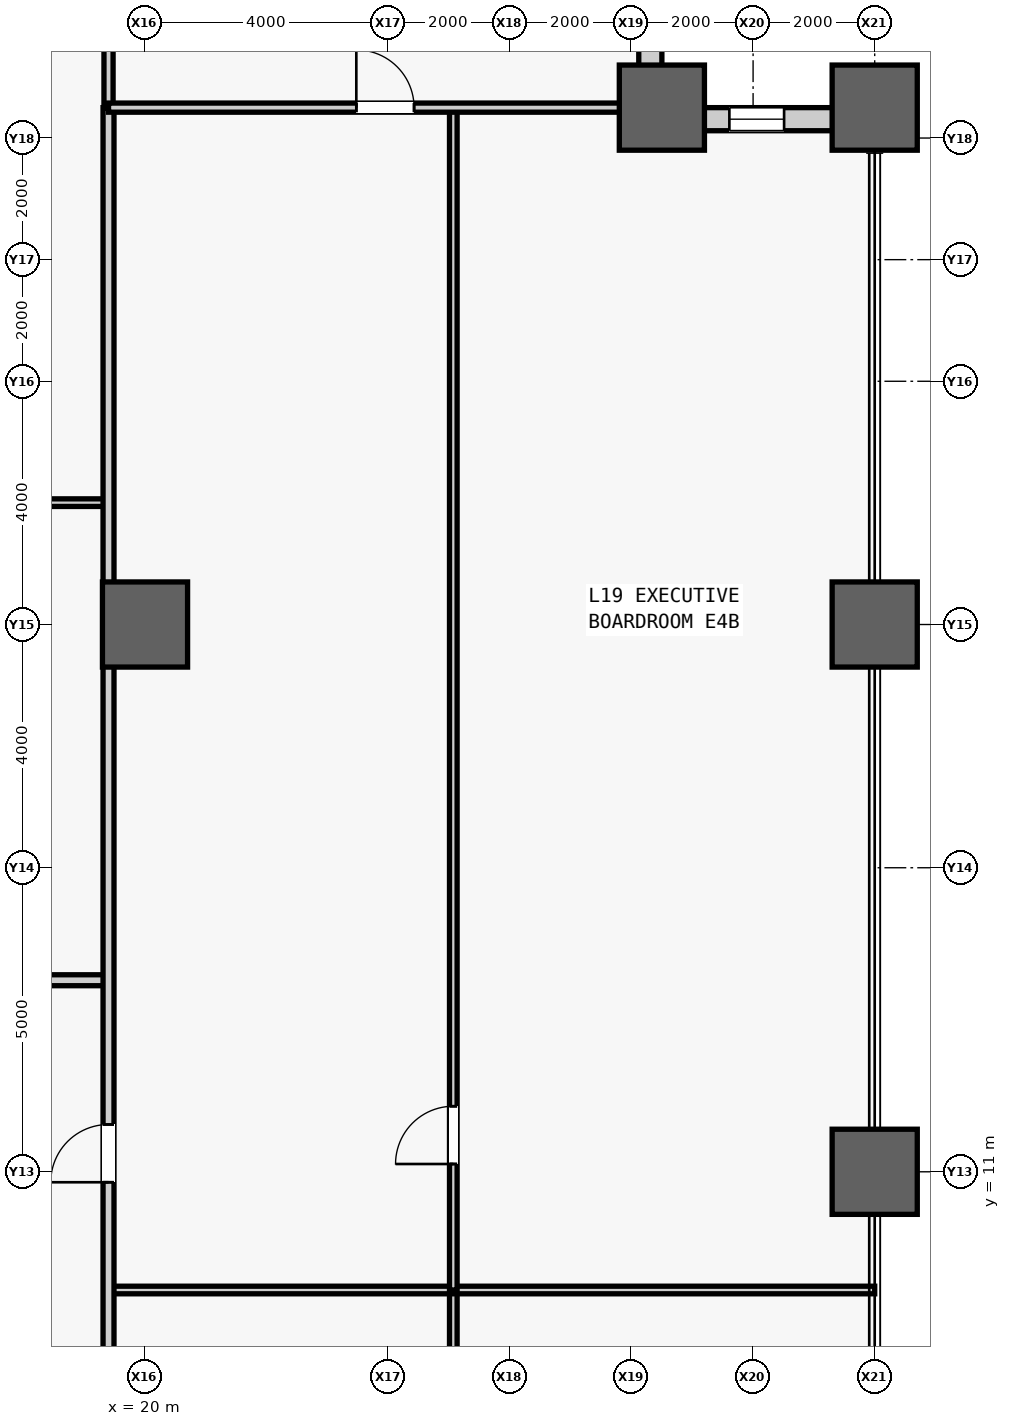
"""IFC4 building model, lengths in metres.
Left out: names, types, materials, properties, quantities, classifications, styles, units other than length and angle.
Written with IfcOpenShell. Run it as: python <this file> out.ifc"""

import sys

from ifc_helpers import new_model, si_unit, direction, frame, frame_2d, origin, origin_2d, place, context, subcontext, project, spatial, rectangle, hollow_rectangle, extrude, source, transform, mapped, element, fill, save


model = new_model("IFC4")
c1 = context("Model", 3, precision=1e-05, world=origin(), true_north=direction((0.0, 1.0)))
c2 = subcontext(c1, "Body", "Model", "MODEL_VIEW")
j1 = project(units=[si_unit("LENGTHUNIT", "METRE"), si_unit("PLANEANGLEUNIT", "RADIAN")], contexts=[c1])
p1 = place(None, origin())
s1 = spatial("IfcSite", under=j1, at=p1, CompositionType="ELEMENT")
p2 = place(p1, origin())
s2 = spatial("IfcBuilding", under=s1, at=p2, CompositionType="ELEMENT")
p3 = place(p2, frame((0.0, 0.0, 87.2)))
s3 = spatial("IfcBuildingStorey", under=s2, at=p3, CompositionType="ELEMENT", Elevation=87.2)
m1 = source(origin(), c2, "Body", "SweptSolid", [
    extrude(hollow_rectangle(XDim=1.4, YDim=1.4, WallThickness=0.075, at=origin_2d()), origin(), (0.0, 0.0, 1.0), 4.2),
])
for number, where, z_axis, x_axis in (
    (1, (20.0, 20.0, 0.0), (0.0, 0.0, 1.0), (1.0, 0.0, 0.0)),
    (2, (28.5, 28.5, 0.0), (0.0, 0.0, 1.0), (1.0, 0.0, 0.0)),
    (3, (32.0, 11.0, 0.0), (0.0, 0.0, 1.0), (1.0, 0.0, 0.0)),
    (4, (32.0, 20.0, 0.0), (0.0, 0.0, 1.0), (1.0, 0.0, 0.0)),
    (5, (32.0, 28.5, 0.0), (0.0, 0.0, 1.0), (1.0, 0.0, 0.0)),
):
    element("IfcColumn", number, at=place(p3, frame(where, z_axis=z_axis, x_axis=x_axis)), inside=s3, PredefinedType="COLUMN", context=c2, shape_type="MappedRepresentation", body=[
        mapped(m1, transform((0.0, 0.0, 0.0), scale=1.0)),
    ])
m2 = source(origin(), c2, "Body", "SweptSolid", [
    extrude(rectangle(XDim=3.12, YDim=0.38, at=frame_2d((1.56, 0.0))), origin(), (0.0, 0.0, 1.0), 3.245),
])
p4 = place(p3, frame((28.5, 28.31, 0.0), z_axis=(0.0, 0.0, 1.0), x_axis=(1.0, 0.0, 0.0)))
e6 = element("IfcWall", 6, at=p4, inside=s3, PredefinedType="STANDARD", context=c2, shape_type="MappedRepresentation", body=[
    mapped(m2, transform((0.0, 0.0, 0.0), scale=1.0)),
])
m3 = source(origin(), c2, "Body", "SweptSolid", [
    extrude(rectangle(XDim=0.9, YDim=2.4, at=frame_2d((0.45, 1.2))), frame((0.0, 0.2, 0.0), z_axis=(0.0, -1.0, 0.0), x_axis=(1.0, 0.0, 0.0)), (0.0, 0.0, 1.0), 0.4),
])
p5 = place(p4, frame((1.11, 0.0, 0.5)))
e7 = element("IfcOpeningElement", 7, at=p5, cuts=e6, PredefinedType="OPENING", context=c2, shape_type="MappedRepresentation", body=[
    mapped(m3, transform((0.0, 0.0, 0.0), scale=1.0)),
])
m4 = source(origin(), c2, "Body", "SweptSolid", [
    extrude(rectangle(XDim=3.12, YDim=0.38, at=frame_2d((1.56, 0.0))), origin(), (0.0, 0.0, 1.0), 2.54),
])
p6 = place(p3, frame((28.31, 28.5, 0.0), z_axis=(0.0, 0.0, 1.0), x_axis=(0.0, 1.0, 0.0)))
e8 = element("IfcWall", 8, at=p6, inside=s3, PredefinedType="STANDARD", context=c2, shape_type="MappedRepresentation", body=[
    mapped(m4, transform((0.0, 0.0, 0.0), scale=1.0)),
])
m5 = source(origin(), c2, "Body", "SweptSolid", [
    extrude(rectangle(XDim=0.9, YDim=1.82, at=frame_2d((0.45, 0.91))), frame((0.0, 0.2, 0.0), z_axis=(0.0, -1.0, 0.0), x_axis=(1.0, 0.0, 0.0)), (0.0, 0.0, 1.0), 0.4),
])
p7 = place(p6, frame((1.11, 0.0, 0.5)))
e9 = element("IfcOpeningElement", 9, at=p7, cuts=e8, PredefinedType="OPENING", context=c2, shape_type="MappedRepresentation", body=[
    mapped(m5, transform((0.0, 0.0, 0.0), scale=1.0)),
])
m6 = source(origin(), c2, "Body", "SweptSolid", [
    extrude(rectangle(XDim=12.903, YDim=0.125, at=frame_2d((6.451, 0.0))), origin(), (0.0, 0.0, 1.0), 3.94),
])
p8 = place(p3, frame((6.497, 22.004, 0.0), z_axis=(0.0, 0.0, 1.0), x_axis=(1.0, 0.0, 0.0)))
e10 = element("IfcWall", 10, at=p8, inside=s3, PredefinedType="PARTITIONING", context=c2, shape_type="MappedRepresentation", body=[
    mapped(m6, transform((0.0, 0.0, 0.0), scale=1.0)),
])
m7 = source(origin(), c2, "Body", "SweptSolid", [
    extrude(rectangle(XDim=0.95, YDim=2.15, at=frame_2d((0.475, 1.075))), frame((0.0, 0.073, 0.0), z_axis=(0.0, -1.0, 0.0), x_axis=(1.0, 0.0, 0.0)), (0.0, 0.0, 1.0), 0.145),
])
p9 = place(p8, frame((5.977, 0.0, 0.0)))
e11 = element("IfcOpeningElement", 11, at=p9, cuts=e10, PredefinedType="OPENING", context=c2, shape_type="MappedRepresentation", body=[
    mapped(m7, transform((0.0, 0.0, 0.0), scale=1.0)),
])
m8 = source(origin(), c2, "Body", "SweptSolid", [
    extrude(rectangle(XDim=37.95, YDim=0.18, at=frame_2d((18.975, 0.0))), origin(), (0.0, 0.0, 1.0), 3.94),
])
p10 = place(p3, frame((-18.55, 14.15, 0.0), z_axis=(0.0, 0.0, 1.0), x_axis=(1.0, 0.0, 0.0)))
e12 = element("IfcWall", 12, at=p10, inside=s3, PredefinedType="PARTITIONING", context=c2, shape_type="MappedRepresentation", body=[
    mapped(m8, transform((0.0, 0.0, 0.0), scale=1.0)),
])
m9 = source(origin(), c2, "Body", "SweptSolid", [
    extrude(rectangle(XDim=1.05, YDim=2.2, at=frame_2d((0.525, 1.1))), frame((0.0, 0.1, 0.0), z_axis=(0.0, -1.0, 0.0), x_axis=(1.0, 0.0, 0.0)), (0.0, 0.0, 1.0), 0.2),
])
p11 = place(p10, frame((7.242, 0.0, 0.0)))
e13 = element("IfcOpeningElement", 13, at=p11, cuts=e12, PredefinedType="OPENING", context=c2, shape_type="MappedRepresentation", body=[
    mapped(m9, transform((0.0, 0.0, 0.0), scale=1.0)),
])
p12 = place(p10, frame((17.691, 0.0, 0.0)))
e14 = element("IfcOpeningElement", 14, at=p12, cuts=e12, PredefinedType="OPENING", context=c2, shape_type="MappedRepresentation", body=[
    mapped(m9, transform((0.0, 0.0, 0.0), scale=1.0)),
])
p13 = place(p10, frame((28.473, 0.0, 0.0)))
e15 = element("IfcOpeningElement", 15, at=p13, cuts=e12, PredefinedType="OPENING", context=c2, shape_type="MappedRepresentation", body=[
    mapped(m9, transform((0.0, 0.0, 0.0), scale=1.0)),
])
m10 = source(origin(), c2, "Body", "SweptSolid", [
    extrude(rectangle(XDim=3.5, YDim=0.15, at=frame_2d((1.75, 0.0))), origin(), (0.0, 0.0, 1.0), 3.94),
])
p14 = place(p3, frame((19.4, 28.5, 0.0), z_axis=(0.0, 0.0, 1.0), x_axis=(0.0, 1.0, 0.0)))
e16 = element("IfcWall", 16, at=p14, inside=s3, PredefinedType="PARTITIONING", context=c2, shape_type="MappedRepresentation", body=[
    mapped(m10, transform((0.0, 0.0, 0.0), scale=1.0)),
])
m11 = source(origin(), c2, "Body", "SweptSolid", [
    extrude(rectangle(XDim=7.641, YDim=0.125, at=frame_2d((3.82, 0.0))), origin(), (0.0, 0.0, 1.0), 3.94),
])
p15 = place(p3, frame((25.07, 1.415, 0.0), z_axis=(0.0, 0.0, 1.0), x_axis=(0.0, 1.0, 0.0)))
e17 = element("IfcWall", 17, at=p15, inside=s3, PredefinedType="PARTITIONING", context=c2, shape_type="MappedRepresentation", body=[
    mapped(m11, transform((0.0, 0.0, 0.0), scale=1.0)),
])
p16 = place(p15, frame((3.345, 0.0, 0.0)))
e18 = element("IfcOpeningElement", 18, at=p16, cuts=e17, PredefinedType="OPENING", context=c2, shape_type="MappedRepresentation", body=[
    mapped(m7, transform((0.0, 0.0, 0.0), scale=1.0)),
])
m12 = source(origin(), c2, "Body", "SweptSolid", [
    extrude(rectangle(XDim=12.6, YDim=0.125, at=frame_2d((6.3, 0.0))), origin(), (0.0, 0.0, 1.0), 3.94),
])
p17 = place(p3, frame((19.4, 9.056, 0.0), z_axis=(0.0, 0.0, 1.0), x_axis=(1.0, 0.0, 0.0)))
e19 = element("IfcWall", 19, at=p17, inside=s3, PredefinedType="PARTITIONING", context=c2, shape_type="MappedRepresentation", body=[
    mapped(m12, transform((0.0, 0.0, 0.0), scale=1.0)),
])
m13 = source(origin(), c2, "Body", "SweptSolid", [
    extrude(rectangle(XDim=19.444, YDim=0.125, at=frame_2d((9.722, 0.0))), origin(), (0.0, 0.0, 1.0), 3.94),
])
p18 = place(p3, frame((25.07, 9.056, 0.0), z_axis=(0.0, 0.0, 1.0), x_axis=(0.0, 1.0, 0.0)))
e20 = element("IfcWall", 20, at=p18, inside=s3, PredefinedType="PARTITIONING", context=c2, shape_type="MappedRepresentation", body=[
    mapped(m13, transform((0.0, 0.0, 0.0), scale=1.0)),
])
p19 = place(p18, frame((2.072, 0.0, 0.0)))
e21 = element("IfcOpeningElement", 21, at=p19, cuts=e20, PredefinedType="OPENING", context=c2, shape_type="MappedRepresentation", body=[
    mapped(m7, transform((0.0, 0.0, 0.0), scale=1.0)),
])
m14 = source(origin(), c2, "Body", "SweptSolid", [
    extrude(rectangle(XDim=57.0, YDim=0.18, at=frame_2d((28.5, 0.0))), origin(), (0.0, 0.0, 1.0), 3.471),
])
p20 = place(p3, frame((19.4, -28.5, 0.0), z_axis=(0.0, 0.0, 1.0), x_axis=(0.0, 1.0, 0.0)))
e22 = element("IfcWall", 22, at=p20, inside=s3, PredefinedType="PARTITIONING", context=c2, shape_type="MappedRepresentation", body=[
    mapped(m14, transform((0.0, 0.0, 0.0), scale=1.0)),
])
m15 = source(origin(), c2, "Body", "SweptSolid", [
    extrude(rectangle(XDim=0.95, YDim=2.15, at=frame_2d((0.475, 1.075))), frame((0.0, 0.1, 0.0), z_axis=(0.0, -1.0, 0.0), x_axis=(1.0, 0.0, 0.0)), (0.0, 0.0, 1.0), 0.2),
])
p21 = place(p20, frame((17.571, 0.0, 0.0)))
e23 = element("IfcOpeningElement", 23, at=p21, cuts=e22, PredefinedType="OPENING", context=c2, shape_type="MappedRepresentation", body=[
    mapped(m15, transform((0.0, 0.0, 0.0), scale=1.0)),
])
p22 = place(p20, frame((25.053, 0.0, 0.0)))
e24 = element("IfcOpeningElement", 24, at=p22, cuts=e22, PredefinedType="OPENING", context=c2, shape_type="MappedRepresentation", body=[
    mapped(m15, transform((0.0, 0.0, 0.0), scale=1.0)),
])
p23 = place(p20, frame((33.26, 0.0, 0.0)))
e25 = element("IfcOpeningElement", 25, at=p23, cuts=e22, PredefinedType="OPENING", context=c2, shape_type="MappedRepresentation", body=[
    mapped(m15, transform((0.0, 0.0, 0.0), scale=1.0)),
])
p24 = place(p20, frame((39.328, 0.0, 0.0)))
e26 = element("IfcOpeningElement", 26, at=p24, cuts=e22, PredefinedType="OPENING", context=c2, shape_type="MappedRepresentation", body=[
    mapped(m15, transform((0.0, 0.0, 0.0), scale=1.0)),
])
m16 = source(origin(), c2, "Body", "SweptSolid", [
    extrude(rectangle(XDim=9.1, YDim=0.15, at=frame_2d((4.55, 0.0))), origin(), (0.0, 0.0, 1.0), 3.94),
])
p25 = place(p3, frame((19.4, 28.5, 0.0), z_axis=(0.0, 0.0, 1.0), x_axis=(1.0, 0.0, 0.0)))
e27 = element("IfcWall", 27, at=p25, inside=s3, PredefinedType="PARTITIONING", context=c2, shape_type="MappedRepresentation", body=[
    mapped(m16, transform((0.0, 0.0, 0.0), scale=1.0)),
])
m17 = source(origin(), c2, "Body", "SweptSolid", [
    extrude(rectangle(XDim=0.95, YDim=2.15, at=frame_2d((0.475, 1.075))), frame((0.0, 0.085, 0.0), z_axis=(0.0, -1.0, 0.0), x_axis=(1.0, 0.0, 0.0)), (0.0, 0.0, 1.0), 0.17),
])
p26 = place(p25, frame((4.075, 0.0, 0.0)))
e28 = element("IfcOpeningElement", 28, at=p26, cuts=e27, PredefinedType="OPENING", context=c2, shape_type="MappedRepresentation", body=[
    mapped(m17, transform((0.0, 0.0, 0.0), scale=1.0)),
])
m18 = source(origin(), c2, "Body", "SweptSolid", [
    extrude(rectangle(XDim=0.9, YDim=2.4, at=frame_2d((0.45, 1.2))), frame((0.0, 0.03, 0.0), z_axis=(0.0, -1.0, 0.0), x_axis=(1.0, 0.0, 0.0)), (0.0, 0.0, 1.0), 0.06),
])
p27 = place(p5, origin())
e29 = element("IfcWindow", 29, at=p27, inside=s3, PartitioningType="SINGLE_PANEL", PredefinedType="WINDOW", context=c2, shape_type="MappedRepresentation", body=[
    mapped(m18, transform((0.0, 0.0, 0.0), scale=1.0)),
])
fill(e7, e29)
m19 = source(origin(), c2, "Body", "SweptSolid", [
    extrude(rectangle(XDim=0.95, YDim=2.15, at=frame_2d((0.475, 1.075))), frame((0.0, 0.025, 0.0), z_axis=(0.0, -1.0, 0.0), x_axis=(1.0, 0.0, 0.0)), (0.0, 0.0, 1.0), 0.05),
])
p28 = place(p19, origin())
e30 = element("IfcDoor", 30, at=p28, inside=s3, OperationType="SINGLE_SWING_LEFT", PredefinedType="DOOR", context=c2, shape_type="MappedRepresentation", body=[
    mapped(m19, transform((0.0, 0.0, 0.0), scale=1.0)),
])
fill(e21, e30)
p29 = place(p24, origin())
e31 = element("IfcDoor", 31, at=p29, inside=s3, OperationType="SINGLE_SWING_LEFT", PredefinedType="DOOR", context=c2, shape_type="MappedRepresentation", body=[
    mapped(m19, transform((0.0, 0.0, 0.0), scale=1.0)),
])
fill(e26, e31)
p30 = place(p26, origin())
e32 = element("IfcDoor", 32, at=p30, inside=s3, OperationType="SINGLE_SWING_LEFT", PredefinedType="DOOR", context=c2, shape_type="MappedRepresentation", body=[
    mapped(m19, transform((0.0, 0.0, 0.0), scale=1.0)),
])
fill(e28, e32)
save(model, sys.argv[1])
